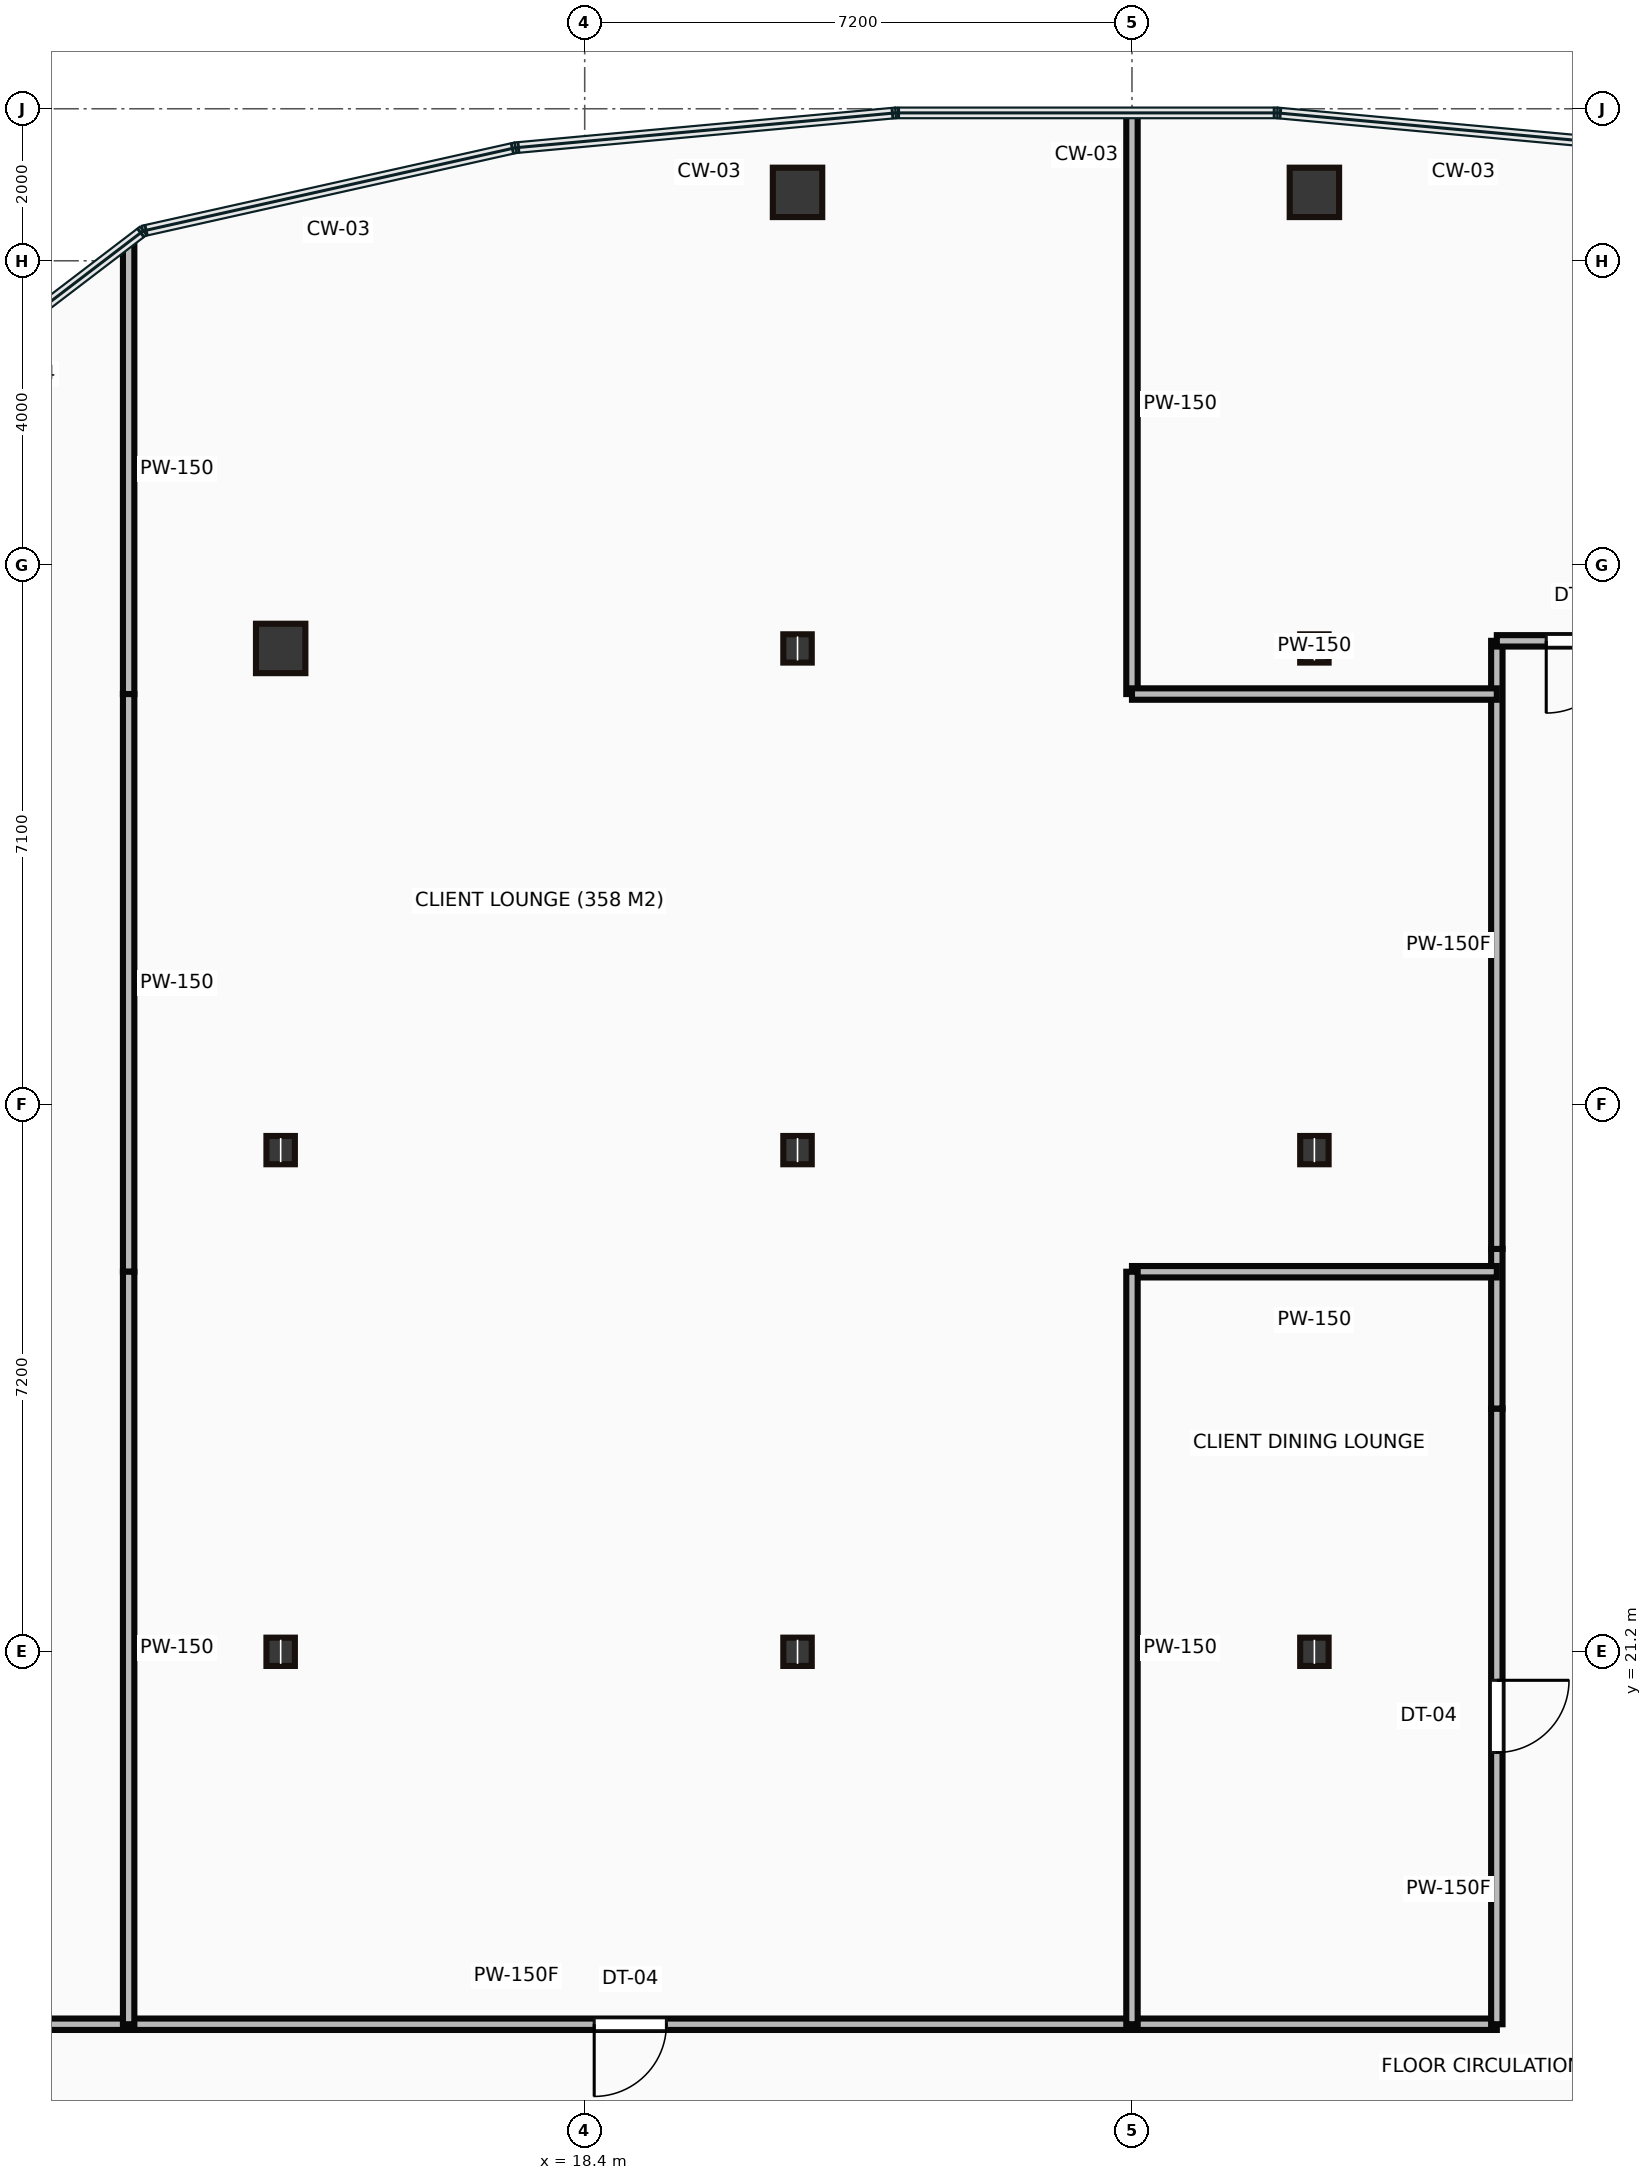
"""IFC4 building model, lengths in metres.
Left out: names, types, materials, properties, quantities, classifications, styles, units other than length and angle.
Written with IfcOpenShell. Run it as: python <this file> out.ifc"""

import sys

from ifc_helpers import new_model, si_unit, direction, frame, frame_2d, origin, origin_2d, place, context, subcontext, project, spatial, rectangle, hollow_rectangle, i_section, extrude, source, transform, mapped, element, fill, save


model = new_model("IFC4")
c1 = context("Model", 3, precision=1e-05, world=origin(), true_north=direction((0.0, 1.0)))
c2 = subcontext(c1, "Body", "Model", "MODEL_VIEW")
j1 = project(units=[si_unit("LENGTHUNIT", "METRE"), si_unit("PLANEANGLEUNIT", "RADIAN")], contexts=[c1])
p1 = place(None, origin())
s1 = spatial("IfcSite", under=j1, at=p1, CompositionType="ELEMENT")
p2 = place(p1, origin())
s2 = spatial("IfcBuilding", under=s1, at=p2, CompositionType="ELEMENT")
p3 = place(p2, frame((0.0, 0.0, 151.55)))
s3 = spatial("IfcBuildingStorey", under=s2, at=p3, CompositionType="ELEMENT", Elevation=151.55)
m1 = source(origin(), c2, "Body", "SweptSolid", [
    extrude(i_section(OverallWidth=0.374, OverallDepth=0.372, WebThickness=0.016, FlangeThickness=0.026, at=origin_2d()), origin(), (0.0, 0.0, 1.0), 3.65),
])
for number, where, z_axis, x_axis in (
    (1, (14.4, 21.2, 0.0), (0.0, 0.0, 1.0), (1.0, 0.0, 0.0)),
    (2, (14.4, 27.8, 0.0), (0.0, 0.0, 1.0), (1.0, 0.0, 0.0)),
):
    element("IfcColumn", number, at=place(p3, frame(where, z_axis=z_axis, x_axis=x_axis)), inside=s3, PredefinedType="COLUMN", context=c2, shape_type="MappedRepresentation", body=[
        mapped(m1, transform((0.0, 0.0, 0.0))),
    ])
m2 = source(origin(), c2, "Body", "SweptSolid", [
    extrude(hollow_rectangle(XDim=0.65, YDim=0.65, WallThickness=0.032, at=origin_2d()), origin(), (0.0, 0.0, 1.0), 3.65),
])
p4 = place(p3, frame((14.4, 34.4, 0.0), z_axis=(0.0, 0.0, 1.0), x_axis=(1.0, 0.0, 0.0)))
e3 = element("IfcColumn", 3, at=p4, inside=s3, PredefinedType="COLUMN", context=c2, shape_type="MappedRepresentation", body=[
    mapped(m2, transform((0.0, 0.0, 0.0))),
])
for number, where, z_axis, x_axis in (
    (4, (21.2, 21.2, 0.0), (0.0, 0.0, 1.0), (1.0, 0.0, 0.0)),
    (5, (21.2, 27.8, 0.0), (0.0, 0.0, 1.0), (1.0, 0.0, 0.0)),
    (6, (21.2, 34.4, 0.0), (0.0, 0.0, 1.0), (1.0, 0.0, 0.0)),
):
    element("IfcColumn", number, at=place(p3, frame(where, z_axis=z_axis, x_axis=x_axis)), inside=s3, PredefinedType="COLUMN", context=c2, shape_type="MappedRepresentation", body=[
        mapped(m1, transform((0.0, 0.0, 0.0))),
    ])
p5 = place(p3, frame((21.2, 40.4, 0.0), z_axis=(0.0, 0.0, 1.0), x_axis=(1.0, 0.0, 0.0)))
e7 = element("IfcColumn", 7, at=p5, inside=s3, PredefinedType="COLUMN", context=c2, shape_type="MappedRepresentation", body=[
    mapped(m2, transform((0.0, 0.0, 0.0))),
])
for number, where, z_axis, x_axis in (
    (8, (28.0, 21.2, 0.0), (0.0, 0.0, 1.0), (1.0, 0.0, 0.0)),
    (9, (28.0, 27.8, 0.0), (0.0, 0.0, 1.0), (1.0, 0.0, 0.0)),
    (10, (28.0, 34.4, 0.0), (0.0, 0.0, 1.0), (1.0, 0.0, 0.0)),
):
    element("IfcColumn", number, at=place(p3, frame(where, z_axis=z_axis, x_axis=x_axis)), inside=s3, PredefinedType="COLUMN", context=c2, shape_type="MappedRepresentation", body=[
        mapped(m1, transform((0.0, 0.0, 0.0))),
    ])
p6 = place(p3, frame((28.0, 40.4, 0.0), z_axis=(0.0, 0.0, 1.0), x_axis=(1.0, 0.0, 0.0)))
e11 = element("IfcColumn", 11, at=p6, inside=s3, PredefinedType="COLUMN", context=c2, shape_type="MappedRepresentation", body=[
    mapped(m2, transform((0.0, 0.0, 0.0))),
])
m3 = source(origin(), c2, "Body", "SweptSolid", [
    extrude(rectangle(XDim=25.8, YDim=0.15, at=frame_2d((12.9, 0.0))), origin(), (0.0, 0.0, 1.0), 3.4),
])
p7 = place(p3, frame((4.6, 16.3, 0.0), z_axis=(0.0, 0.0, 1.0), x_axis=(1.0, 0.0, 0.0)))
e12 = element("IfcWall", 12, at=p7, inside=s3, PredefinedType="PARTITIONING", context=c2, shape_type="MappedRepresentation", body=[
    mapped(m3, transform((0.0, 0.0, 0.0))),
])
p8 = place(p7, frame((3.555, 0.0, 0.0)))
e13 = element("IfcOpeningElement", 13, at=p8, cuts=e12, PredefinedType="OPENING", context=c2, shape_type="SweptSolid", body=[
    extrude(rectangle(XDim=0.95, YDim=2.15, at=frame_2d((0.475, 1.075))), frame((0.0, 0.085, 0.0), z_axis=(0.0, -1.0, 0.0), x_axis=(1.0, 0.0, 0.0)), (0.0, 0.0, 1.0), 0.17),
])
p9 = place(p7, frame((13.925, 0.0, 0.0)))
e14 = element("IfcOpeningElement", 14, at=p9, cuts=e12, PredefinedType="OPENING", context=c2, shape_type="SweptSolid", body=[
    extrude(rectangle(XDim=0.95, YDim=2.15, at=frame_2d((0.475, 1.075))), frame((0.0, 0.085, 0.0), z_axis=(0.0, -1.0, 0.0), x_axis=(1.0, 0.0, 0.0)), (0.0, 0.0, 1.0), 0.17),
])
m4 = source(origin(), c2, "Body", "SweptSolid", [
    extrude(rectangle(XDim=8.1, YDim=0.15, at=frame_2d((4.05, 0.0))), origin(), (0.0, 0.0, 1.0), 3.4),
])
p10 = place(p3, frame((30.4, 16.3, 0.0), z_axis=(0.0, 0.0, 1.0), x_axis=(0.0, 1.0, 0.0)))
e15 = element("IfcWall", 15, at=p10, inside=s3, PredefinedType="PARTITIONING", context=c2, shape_type="MappedRepresentation", body=[
    mapped(m4, transform((0.0, 0.0, 0.0))),
])
p11 = place(p10, frame((3.575, 0.0, 0.0)))
e16 = element("IfcOpeningElement", 16, at=p11, cuts=e15, PredefinedType="OPENING", context=c2, shape_type="SweptSolid", body=[
    extrude(rectangle(XDim=0.95, YDim=2.15, at=frame_2d((0.475, 1.075))), frame((0.0, 0.085, 0.0), z_axis=(0.0, -1.0, 0.0), x_axis=(1.0, 0.0, 0.0)), (0.0, 0.0, 1.0), 0.17),
])
m5 = source(origin(), c2, "Body", "SweptSolid", [
    extrude(rectangle(XDim=2.1, YDim=0.15, at=frame_2d((1.05, 0.0))), origin(), (0.0, 0.0, 1.0), 3.4),
])
p12 = place(p3, frame((30.4, 24.4, 0.0), z_axis=(0.0, 0.0, 1.0), x_axis=(0.0, 1.0, 0.0)))
e17 = element("IfcWall", 17, at=p12, inside=s3, PredefinedType="PARTITIONING", context=c2, shape_type="MappedRepresentation", body=[
    mapped(m5, transform((0.0, 0.0, 0.0))),
])
m6 = source(origin(), c2, "Body", "SweptSolid", [
    extrude(rectangle(XDim=8.0, YDim=0.15, at=frame_2d((4.0, 0.0))), origin(), (0.0, 0.0, 1.0), 3.4),
])
p13 = place(p3, frame((30.4, 26.5, 0.0), z_axis=(0.0, 0.0, 1.0), x_axis=(0.0, 1.0, 0.0)))
e18 = element("IfcWall", 18, at=p13, inside=s3, PredefinedType="PARTITIONING", context=c2, shape_type="MappedRepresentation", body=[
    mapped(m6, transform((0.0, 0.0, 0.0))),
])
m7 = source(origin(), c2, "Body", "SweptSolid", [
    extrude(rectangle(XDim=2.25, YDim=0.15, at=frame_2d((1.125, 0.0))), origin(), (0.0, 0.0, 1.0), 2.76),
])
p14 = place(p3, frame((30.4, 34.5, 0.0), z_axis=(0.0, 0.0, 1.0), x_axis=(1.0, 0.0, 0.0)))
e19 = element("IfcWall", 19, at=p14, inside=s3, PredefinedType="PARTITIONING", context=c2, shape_type="MappedRepresentation", body=[
    mapped(m7, transform((0.0, 0.0, 0.0))),
])
p15 = place(p14, frame((0.65, 0.0, 0.0)))
e20 = element("IfcOpeningElement", 20, at=p15, cuts=e19, PredefinedType="OPENING", context=c2, shape_type="SweptSolid", body=[
    extrude(rectangle(XDim=0.95, YDim=2.15, at=frame_2d((0.475, 1.075))), frame((0.0, 0.085, 0.0), z_axis=(0.0, -1.0, 0.0), x_axis=(1.0, 0.0, 0.0)), (0.0, 0.0, 1.0), 0.17),
])
m8 = source(origin(), c2, "Body", "SweptSolid", [
    extrude(rectangle(XDim=5.922, YDim=0.15, at=frame_2d((2.961, 0.0))), origin(), (0.0, 0.0, 1.0), 3.4),
])
p16 = place(p3, frame((12.4, 39.722, 0.0), z_axis=(0.0, 0.0, 1.0), x_axis=(0.0, -1.0, 0.0)))
e21 = element("IfcWall", 21, at=p16, inside=s3, PredefinedType="PARTITIONING", context=c2, shape_type="MappedRepresentation", body=[
    mapped(m8, transform((0.0, 0.0, 0.0))),
])
m9 = source(origin(), c2, "Body", "SweptSolid", [
    extrude(rectangle(XDim=7.6, YDim=0.15, at=frame_2d((3.8, 0.0))), origin(), (0.0, 0.0, 1.0), 3.4),
])
p17 = place(p3, frame((12.4, 33.8, 0.0), z_axis=(0.0, 0.0, 1.0), x_axis=(0.0, -1.0, 0.0)))
e22 = element("IfcWall", 22, at=p17, inside=s3, PredefinedType="PARTITIONING", context=c2, shape_type="MappedRepresentation", body=[
    mapped(m9, transform((0.0, 0.0, 0.0))),
])
m10 = source(origin(), c2, "Body", "SweptSolid", [
    extrude(rectangle(XDim=9.9, YDim=0.15, at=frame_2d((4.95, 0.0))), origin(), (0.0, 0.0, 1.0), 3.4),
])
p18 = place(p3, frame((12.4, 26.2, 0.0), z_axis=(0.0, 0.0, 1.0), x_axis=(0.0, -1.0, 0.0)))
e23 = element("IfcWall", 23, at=p18, inside=s3, PredefinedType="PARTITIONING", context=c2, shape_type="MappedRepresentation", body=[
    mapped(m10, transform((0.0, 0.0, 0.0))),
])
m11 = source(origin(), c2, "Body", "SweptSolid", [
    extrude(rectangle(XDim=4.8, YDim=0.15, at=frame_2d((2.4, 0.0))), origin(), (0.0, 0.0, 1.0), 3.4),
])
p19 = place(p3, frame((30.4, 26.2, 0.0), z_axis=(0.0, 0.0, 1.0), x_axis=(-1.0, 0.0, 0.0)))
e24 = element("IfcWall", 24, at=p19, inside=s3, PredefinedType="PARTITIONING", context=c2, shape_type="MappedRepresentation", body=[
    mapped(m11, transform((0.0, 0.0, 0.0))),
])
p20 = place(p3, frame((25.6, 26.2, 0.0), z_axis=(0.0, 0.0, 1.0), x_axis=(0.0, -1.0, 0.0)))
e25 = element("IfcWall", 25, at=p20, inside=s3, PredefinedType="PARTITIONING", context=c2, shape_type="MappedRepresentation", body=[
    mapped(m10, transform((0.0, 0.0, 0.0))),
])
m12 = source(origin(), c2, "Body", "SweptSolid", [
    extrude(rectangle(XDim=7.625, YDim=0.15, at=frame_2d((3.813, 0.0))), origin(), (0.0, 0.0, 1.0), 3.4),
])
p21 = place(p3, frame((25.6, 41.426, 0.0), z_axis=(0.0, 0.0, 1.0), x_axis=(0.0, -1.0, 0.0)))
e26 = element("IfcWall", 26, at=p21, inside=s3, PredefinedType="PARTITIONING", context=c2, shape_type="MappedRepresentation", body=[
    mapped(m12, transform((0.0, 0.0, 0.0))),
])
p22 = place(p3, frame((25.6, 33.8, 0.0), z_axis=(0.0, 0.0, 1.0), x_axis=(1.0, 0.0, 0.0)))
e27 = element("IfcWall", 27, at=p22, inside=s3, PredefinedType="PARTITIONING", context=c2, shape_type="MappedRepresentation", body=[
    mapped(m11, transform((0.0, 0.0, 0.0))),
])
m13 = source(origin(), c2, "Body", "SweptSolid", [
    extrude(rectangle(XDim=0.95, YDim=2.15, at=frame_2d((0.475, 1.075))), frame((0.0, 0.025, 0.0), z_axis=(0.0, -1.0, 0.0), x_axis=(1.0, 0.0, 0.0)), (0.0, 0.0, 1.0), 0.05),
])
p23 = place(p9, origin())
e28 = element("IfcDoor", 28, at=p23, inside=s3, OperationType="SINGLE_SWING_LEFT", PredefinedType="DOOR", context=c2, shape_type="MappedRepresentation", body=[
    mapped(m13, transform((0.0, 0.0, 0.0))),
])
fill(e14, e28)
p24 = place(p11, origin())
e29 = element("IfcDoor", 29, at=p24, inside=s3, OperationType="SINGLE_SWING_RIGHT", PredefinedType="DOOR", context=c2, shape_type="MappedRepresentation", body=[
    mapped(m13, transform((0.0, 0.0, 0.0))),
])
fill(e16, e29)
p25 = place(p15, origin())
e30 = element("IfcDoor", 30, at=p25, inside=s3, OperationType="SINGLE_SWING_LEFT", PredefinedType="DOOR", context=c2, shape_type="MappedRepresentation", body=[
    mapped(m13, transform((0.0, 0.0, 0.0))),
])
fill(e20, e30)
save(model, sys.argv[1])
